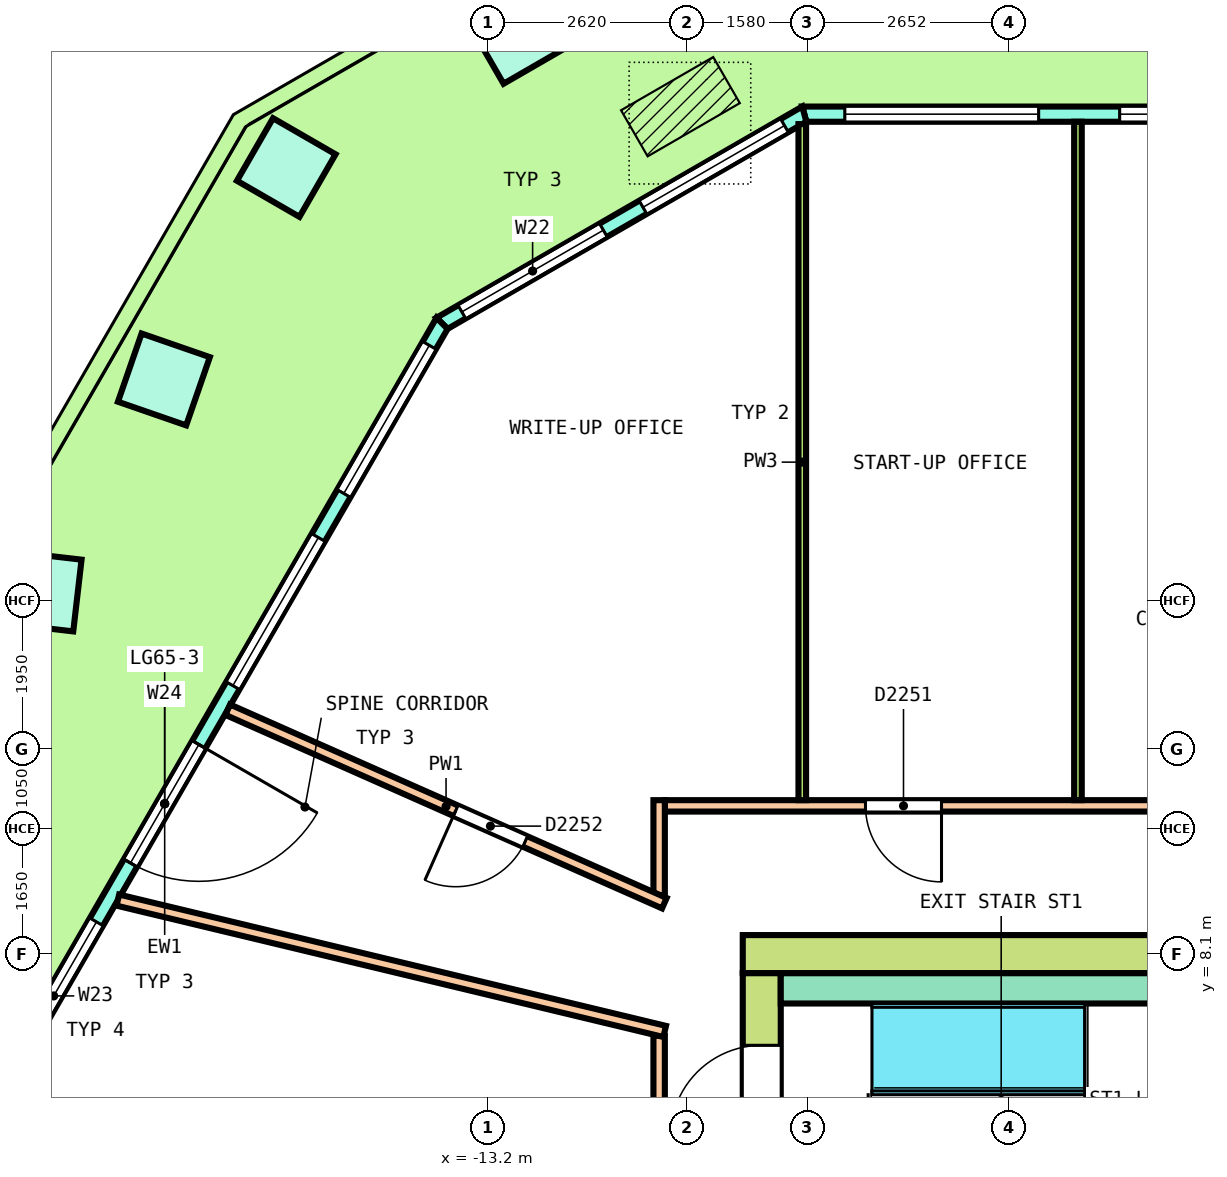
"""IFC4 building model, lengths in metres.
Left out: names, types, materials, properties, quantities, classifications, styles, units other than length and angle.
Written with IfcOpenShell. Run it as: python <this file> out.ifc"""

import sys

from ifc_helpers import new_model, si_unit, direction, frame, frame_2d, origin, origin_2d, place, context, subcontext, project, spatial, polyline, rectangle, outline, extrude, element, fill, save


model = new_model("IFC4")
c1 = context("Model", 3, precision=1e-05, world=origin(), true_north=direction((0.0, 1.0)))
c2 = subcontext(c1, "Body", "Model", "MODEL_VIEW")
j1 = project(units=[si_unit("LENGTHUNIT", "METRE"), si_unit("PLANEANGLEUNIT", "RADIAN")], contexts=[c1])
p1 = place(None, origin())
s1 = spatial("IfcSite", under=j1, at=p1, CompositionType="ELEMENT")
p2 = place(p1, origin())
s2 = spatial("IfcBuilding", under=s1, at=p2, CompositionType="ELEMENT")
p3 = place(p2, frame((0.0, 0.0, 295.0)))
s3 = spatial("IfcBuildingStorey", under=s2, at=p3, CompositionType="ELEMENT", Elevation=295.0)
for number, where, z_axis, x_axis in (
    (1, (-12.823, 20.199, 0.0), (-0.036, 0.0, 0.999), (-0.865, -0.5, -0.031)),
    (2, (-15.856, 18.448, 0.0), (-0.036, 0.0, 0.999), (-0.499, -0.866, -0.018)),
):
    element("IfcColumn", number, at=place(p3, frame(where, z_axis=z_axis, x_axis=x_axis)), inside=s3, PredefinedType="COLUMN", context=c2, shape_type="SweptSolid", body=[
        extrude(rectangle(XDim=0.95, YDim=0.95, at=origin_2d()), origin(), (0.0, 0.0, 1.0), 3.642),
    ])
p4 = place(p3, frame((-17.466, 15.66, 0.0), z_axis=(-0.032646772519, 0.006301430425, 0.999447087253), x_axis=(-0.500366215775, -0.865745428355, -0.010885926408)))
e3 = element("IfcColumn", 3, at=p4, inside=s3, PredefinedType="COLUMN", context=c2, shape_type="SweptSolid", body=[
    extrude(rectangle(XDim=0.95, YDim=0.95, at=origin_2d()), origin(), (0.0, 0.0, 1.0), 3.642),
])
p5 = place(p3, frame((-19.075, 12.872, 0.0), z_axis=(-0.029028337746, 0.012536487664, 0.999499971028), x_axis=(-0.499520818378, -0.866294227933, -0.003641793127)))
e4 = element("IfcColumn", 4, at=p5, inside=s3, PredefinedType="COLUMN", context=c2, shape_type="SweptSolid", body=[
    extrude(rectangle(XDim=0.95, YDim=0.95, at=origin_2d()), origin(), (0.0, 0.0, 1.0), 3.642),
])
p6 = place(p3, frame((9.04, 19.15, 0.0), z_axis=(0.0, 0.0, 1.0), x_axis=(-1.0, 0.0, 0.0)))
e5 = element("IfcWall", 5, at=p6, inside=s3, PredefinedType="SOLIDWALL", context=c2, shape_type="SweptSolid", body=[
    extrude(outline(polyline([(-0.027, -0.1), (0.98, -0.1), (1.988, -0.1), (2.995, -0.1), (4.003, -0.1), (5.01, -0.1), (6.018, -0.1), (7.025, -0.1), (8.033, -0.1), (9.04, -0.1), (10.047, -0.1), (11.055, -0.1), (12.062, -0.1), (13.07, -0.1), (14.077, -0.1), (15.085, -0.1), (16.092, -0.1), (17.1, -0.1), (18.107, -0.1), (18.053, 0.1), (17.052, 0.1), (16.05, 0.1), (15.049, 0.1), (14.047, 0.1), (13.046, 0.1), (12.044, 0.1), (11.043, 0.1), (10.042, 0.1), (9.04, 0.1), (8.039, 0.1), (7.037, 0.1), (6.036, 0.1), (5.034, 0.1), (4.033, 0.1), (3.031, 0.1), (2.03, 0.1), (1.028, 0.1), (0.027, 0.1), (-0.027, -0.1)])), origin(), (0.0, 0.0, 1.0), 3.7),
])
p7 = place(p6, frame((0.533, 0.0, 0.1)))
e6 = element("IfcOpeningElement", 6, at=p7, cuts=e5, PredefinedType="OPENING", context=c2, shape_type="SweptSolid", body=[
    extrude(rectangle(XDim=2.55, YDim=2.75, at=frame_2d((1.275, 1.375))), frame((0.0, 0.11, 0.0), z_axis=(0.0, -1.0, 0.0), x_axis=(1.0, 0.0, 0.0)), (0.0, 0.0, 1.0), 0.22),
])
p8 = place(p6, frame((4.149, 0.0, 0.1)))
e7 = element("IfcOpeningElement", 7, at=p8, cuts=e5, PredefinedType="OPENING", context=c2, shape_type="SweptSolid", body=[
    extrude(rectangle(XDim=2.55, YDim=2.75, at=frame_2d((1.275, 1.375))), frame((0.0, 0.11, 0.0), z_axis=(0.0, -1.0, 0.0), x_axis=(1.0, 0.0, 0.0)), (0.0, 0.0, 1.0), 0.22),
])
p9 = place(p6, frame((8.14, 0.0, 0.0)))
e8 = element("IfcOpeningElement", 8, at=p9, cuts=e5, PredefinedType="OPENING", context=c2, shape_type="SweptSolid", body=[
    extrude(rectangle(XDim=1.8, YDim=2.4, at=frame_2d((0.9, 1.2))), frame((0.0, 0.11, 0.0), z_axis=(0.0, -1.0, 0.0), x_axis=(1.0, 0.0, 0.0)), (0.0, 0.0, 1.0), 0.22),
])
p10 = place(p6, frame((8.14, 0.0, 2.55)))
e9 = element("IfcOpeningElement", 9, at=p10, cuts=e5, PredefinedType="OPENING", context=c2, shape_type="SweptSolid", body=[
    extrude(rectangle(XDim=1.8, YDim=0.3, at=frame_2d((0.9, 0.15))), frame((0.0, 0.11, 0.0), z_axis=(0.0, -1.0, 0.0), x_axis=(1.0, 0.0, 0.0)), (0.0, 0.0, 1.0), 0.22),
])
p11 = place(p6, frame((11.381, 0.0, 0.1)))
e10 = element("IfcOpeningElement", 10, at=p11, cuts=e5, PredefinedType="OPENING", context=c2, shape_type="SweptSolid", body=[
    extrude(rectangle(XDim=2.55, YDim=2.75, at=frame_2d((1.275, 1.375))), frame((0.0, 0.11, 0.0), z_axis=(0.0, -1.0, 0.0), x_axis=(1.0, 0.0, 0.0)), (0.0, 0.0, 1.0), 0.22),
])
p12 = place(p6, frame((14.997, 0.0, 0.1)))
e11 = element("IfcOpeningElement", 11, at=p12, cuts=e5, PredefinedType="OPENING", context=c2, shape_type="SweptSolid", body=[
    extrude(rectangle(XDim=2.55, YDim=2.75, at=frame_2d((1.275, 1.375))), frame((0.0, 0.11, 0.0), z_axis=(0.0, -1.0, 0.0), x_axis=(1.0, 0.0, 0.0)), (0.0, 0.0, 1.0), 0.22),
])
p13 = place(p3, frame((-9.04, 19.15, 0.0), z_axis=(0.0, 0.0, 1.0), x_axis=(-0.866026017613, -0.499998936816, 0.0)))
e12 = element("IfcWall", 12, at=p13, inside=s3, PredefinedType="SOLIDWALL", context=c2, shape_type="SweptSolid", body=[
    extrude(outline(polyline([(-0.027, -0.1), (1.084, -0.1), (2.196, -0.1), (3.307, -0.1), (4.419, -0.1), (5.53, -0.1), (5.477, 0.1), (4.387, 0.1), (3.297, 0.1), (2.207, 0.1), (1.117, 0.1), (0.027, 0.1), (-0.027, -0.1)])), origin(), (0.0, 0.0, 1.0), 3.7),
])
p14 = place(p13, frame((0.301, 0.0, 0.1)))
e13 = element("IfcOpeningElement", 13, at=p14, cuts=e12, PredefinedType="OPENING", context=c2, shape_type="SweptSolid", body=[
    extrude(rectangle(XDim=2.15, YDim=2.75, at=frame_2d((1.075, 1.375))), frame((0.0, 0.11, 0.0), z_axis=(0.0, -1.0, 0.0), x_axis=(1.0, 0.0, 0.0)), (0.0, 0.0, 1.0), 0.22),
])
p15 = place(p13, frame((3.052, 0.0, 0.1)))
e14 = element("IfcOpeningElement", 14, at=p15, cuts=e12, PredefinedType="OPENING", context=c2, shape_type="SweptSolid", body=[
    extrude(rectangle(XDim=2.15, YDim=2.75, at=frame_2d((1.075, 1.375))), frame((0.0, 0.11, 0.0), z_axis=(0.0, -1.0, 0.0), x_axis=(1.0, 0.0, 0.0)), (0.0, 0.0, 1.0), 0.22),
])
p16 = place(p3, frame((-13.806, 16.398, 0.0), z_axis=(0.0, 0.0, 1.0), x_axis=(-0.500006712695, -0.866021528173, 0.0)))
e15 = element("IfcWall", 15, at=p16, inside=s3, PredefinedType="SOLIDWALL", context=c2, shape_type="SweptSolid", body=[
    extrude(outline(polyline([(-0.027, -0.1), (1.02, -0.1), (2.066, -0.1), (3.113, -0.1), (4.159, -0.1), (5.205, -0.1), (6.252, -0.1), (7.298, -0.1), (8.345, -0.1), (9.391, -0.1), (10.438, -0.1), (11.484, -0.1), (12.531, -0.1), (13.577, -0.1), (14.623, -0.1), (14.57, 0.1), (13.531, 0.1), (12.492, 0.1), (11.453, 0.1), (10.415, 0.1), (9.376, 0.1), (8.337, 0.1), (7.298, 0.1), (6.26, 0.1), (5.221, 0.1), (4.182, 0.1), (3.143, 0.1), (2.104, 0.1), (1.066, 0.1), (0.027, 0.1), (-0.027, -0.1)])), origin(), (0.0, 0.0, 1.0), 3.7),
])
p17 = place(p16, frame((0.335, 0.0, 0.1)))
e16 = element("IfcOpeningElement", 16, at=p17, cuts=e15, PredefinedType="OPENING", context=c2, shape_type="SweptSolid", body=[
    extrude(rectangle(XDim=2.25, YDim=2.75, at=frame_2d((1.125, 1.375))), frame((0.0, 0.11, 0.0), z_axis=(0.0, -1.0, 0.0), x_axis=(1.0, 0.0, 0.0)), (0.0, 0.0, 1.0), 0.22),
])
p18 = place(p16, frame((3.254, 0.0, 0.1)))
e17 = element("IfcOpeningElement", 17, at=p18, cuts=e15, PredefinedType="OPENING", context=c2, shape_type="SweptSolid", body=[
    extrude(rectangle(XDim=2.25, YDim=2.75, at=frame_2d((1.125, 1.375))), frame((0.0, 0.11, 0.0), z_axis=(0.0, -1.0, 0.0), x_axis=(1.0, 0.0, 0.0)), (0.0, 0.0, 1.0), 0.22),
])
p19 = place(p16, frame((6.398, 0.0, 0.0)))
e18 = element("IfcOpeningElement", 18, at=p19, cuts=e15, PredefinedType="OPENING", context=c2, shape_type="SweptSolid", body=[
    extrude(rectangle(XDim=1.8, YDim=2.4, at=frame_2d((0.9, 1.2))), frame((0.0, 0.11, 0.0), z_axis=(0.0, -1.0, 0.0), x_axis=(1.0, 0.0, 0.0)), (0.0, 0.0, 1.0), 0.22),
])
p20 = place(p16, frame((6.398, 0.0, 2.55)))
e19 = element("IfcOpeningElement", 19, at=p20, cuts=e15, PredefinedType="OPENING", context=c2, shape_type="SweptSolid", body=[
    extrude(rectangle(XDim=1.8, YDim=0.3, at=frame_2d((0.9, 0.15))), frame((0.0, 0.11, 0.0), z_axis=(0.0, -1.0, 0.0), x_axis=(1.0, 0.0, 0.0)), (0.0, 0.0, 1.0), 0.22),
])
p21 = place(p16, frame((9.093, 0.0, 0.1)))
e20 = element("IfcOpeningElement", 20, at=p21, cuts=e15, PredefinedType="OPENING", context=c2, shape_type="SweptSolid", body=[
    extrude(rectangle(XDim=2.25, YDim=2.75, at=frame_2d((1.125, 1.375))), frame((0.0, 0.11, 0.0), z_axis=(0.0, -1.0, 0.0), x_axis=(1.0, 0.0, 0.0)), (0.0, 0.0, 1.0), 0.22),
])
p22 = place(p16, frame((12.012, 0.0, 0.1)))
e21 = element("IfcOpeningElement", 21, at=p22, cuts=e15, PredefinedType="OPENING", context=c2, shape_type="SweptSolid", body=[
    extrude(rectangle(XDim=2.25, YDim=2.75, at=frame_2d((1.125, 1.375))), frame((0.0, 0.11, 0.0), z_axis=(0.0, -1.0, 0.0), x_axis=(1.0, 0.0, 0.0)), (0.0, 0.0, 1.0), 0.22),
])
p23 = place(p3, frame((-9.85, 8.1, 0.0), z_axis=(0.0, 0.0, 1.0), x_axis=(1.0, 0.0, 0.0)))
e22 = element("IfcWall", 22, at=p23, inside=s3, PredefinedType="SHEAR", context=c2, shape_type="SweptSolid", body=[
    extrude(rectangle(XDim=19.7, YDim=0.5, at=frame_2d((9.85, 0.0))), origin(), (0.0, 0.0, 1.0), 3.7),
])
p24 = place(p23, frame((10.775, 0.0, 0.0)))
e23 = element("IfcOpeningElement", 23, at=p24, cuts=e22, PredefinedType="OPENING", context=c2, shape_type="SweptSolid", body=[
    extrude(rectangle(XDim=1.4, YDim=2.1, at=frame_2d((0.7, 1.05))), frame((0.0, 0.26, 0.0), z_axis=(0.0, -1.0, 0.0), x_axis=(1.0, 0.0, 0.0)), (0.0, 0.0, 1.0), 0.52),
])
p25 = place(p3, frame((-9.6, -7.85, 0.0), z_axis=(0.0, 0.0, 1.0), x_axis=(0.0, 1.0, 0.0)))
e24 = element("IfcWall", 24, at=p25, inside=s3, PredefinedType="SHEAR", context=c2, shape_type="SweptSolid", body=[
    extrude(rectangle(XDim=15.7, YDim=0.5, at=frame_2d((7.85, 0.0))), origin(), (0.0, 0.0, 1.0), 3.7),
])
p26 = place(p25, frame((6.65, 0.0, 0.0)))
e25 = element("IfcOpeningElement", 25, at=p26, cuts=e24, PredefinedType="OPENING", context=c2, shape_type="SweptSolid", body=[
    extrude(rectangle(XDim=2.4, YDim=2.1, at=frame_2d((1.2, 1.05))), frame((0.0, 0.26, 0.0), z_axis=(0.0, -1.0, 0.0), x_axis=(1.0, 0.0, 0.0)), (0.0, 0.0, 1.0), 0.52),
])
p27 = place(p25, frame((13.55, 0.0, 0.0)))
e26 = element("IfcOpeningElement", 26, at=p27, cuts=e24, PredefinedType="OPENING", context=c2, shape_type="SweptSolid", body=[
    extrude(rectangle(XDim=1.2, YDim=2.1, at=frame_2d((0.6, 1.05))), frame((0.0, 0.26, 0.0), z_axis=(0.0, -1.0, 0.0), x_axis=(1.0, 0.0, 0.0)), (0.0, 0.0, 1.0), 0.52),
])
p28 = place(p25, frame((0.95, 0.0, 0.0)))
e27 = element("IfcOpeningElement", 27, at=p28, cuts=e24, PredefinedType="OPENING", context=c2, shape_type="SweptSolid", body=[
    extrude(rectangle(XDim=1.2, YDim=2.1, at=frame_2d((0.6, 1.05))), frame((0.0, 0.26, 0.0), z_axis=(0.0, -1.0, 0.0), x_axis=(1.0, 0.0, 0.0)), (0.0, 0.0, 1.0), 0.52),
])
p29 = place(p3, frame((-9.35, 7.65, 0.0), z_axis=(0.0, 0.0, 1.0), x_axis=(1.0, 0.0, 0.0)))
e28 = element("IfcWall", 28, at=p29, inside=s3, PredefinedType="SOLIDWALL", context=c2, shape_type="SweptSolid", body=[
    extrude(rectangle(XDim=5.8, YDim=0.4, at=frame_2d((2.9, 0.0))), origin(), (0.0, 0.0, 1.0), 3.7),
])
p30 = place(p3, frame((-10.875, 10.05, 0.0), z_axis=(0.0, 0.0, 1.0), x_axis=(1.0, 0.0, 0.0)))
e29 = element("IfcWall", 29, at=p30, inside=s3, PredefinedType="PARTITIONING", context=c2, shape_type="SweptSolid", body=[
    extrude(rectangle(XDim=21.775, YDim=0.15, at=frame_2d((10.887, 0.0))), origin(), (0.0, 0.0, 1.0), 2.9),
])
p31 = place(p30, frame((20.411, 0.0, 0.0)))
e30 = element("IfcOpeningElement", 30, at=p31, cuts=e29, PredefinedType="OPENING", context=c2, shape_type="SweptSolid", body=[
    extrude(rectangle(XDim=1.0, YDim=2.1, at=frame_2d((0.5, 1.05))), frame((0.0, 0.085, 0.0), z_axis=(0.0, -1.0, 0.0), x_axis=(1.0, 0.0, 0.0)), (0.0, 0.0, 1.0), 0.17),
])
p32 = place(p30, frame((16.518, 0.0, 0.0)))
e31 = element("IfcOpeningElement", 31, at=p32, cuts=e29, PredefinedType="OPENING", context=c2, shape_type="SweptSolid", body=[
    extrude(rectangle(XDim=1.2, YDim=2.1, at=frame_2d((0.6, 1.05))), frame((0.0, 0.085, 0.0), z_axis=(0.0, -1.0, 0.0), x_axis=(1.0, 0.0, 0.0)), (0.0, 0.0, 1.0), 0.17),
])
p33 = place(p30, frame((7.659, 0.0, 0.0)))
e32 = element("IfcOpeningElement", 32, at=p33, cuts=e29, PredefinedType="OPENING", context=c2, shape_type="SweptSolid", body=[
    extrude(rectangle(XDim=1.2, YDim=2.1, at=frame_2d((0.6, 1.05))), frame((0.0, 0.085, 0.0), z_axis=(0.0, -1.0, 0.0), x_axis=(1.0, 0.0, 0.0)), (0.0, 0.0, 1.0), 0.17),
])
p34 = place(p30, frame((2.64, 0.0, 0.0)))
e33 = element("IfcOpeningElement", 33, at=p34, cuts=e29, PredefinedType="OPENING", context=c2, shape_type="SweptSolid", body=[
    extrude(rectangle(XDim=1.0, YDim=2.1, at=frame_2d((0.5, 1.05))), frame((0.0, 0.085, 0.0), z_axis=(0.0, -1.0, 0.0), x_axis=(1.0, 0.0, 0.0)), (0.0, 0.0, 1.0), 0.17),
])
p35 = place(p3, frame((-10.95, -9.975, 0.0), z_axis=(0.0, 0.0, 1.0), x_axis=(0.0, 1.0, 0.0)))
e34 = element("IfcWall", 34, at=p35, inside=s3, PredefinedType="PARTITIONING", context=c2, shape_type="SweptSolid", body=[
    extrude(rectangle(XDim=17.0, YDim=0.15, at=frame_2d((8.5, 0.0))), origin(), (0.0, 0.0, 1.0), 2.9),
])
p36 = place(p35, frame((10.72, 0.0, 0.0)))
e35 = element("IfcOpeningElement", 35, at=p36, cuts=e34, PredefinedType="OPENING", context=c2, shape_type="SweptSolid", body=[
    extrude(rectangle(XDim=1.2, YDim=2.1, at=frame_2d((0.6, 1.05))), frame((0.0, 0.085, 0.0), z_axis=(0.0, -1.0, 0.0), x_axis=(1.0, 0.0, 0.0)), (0.0, 0.0, 1.0), 0.17),
])
p37 = place(p35, frame((5.916, 0.0, 0.0)))
e36 = element("IfcOpeningElement", 36, at=p37, cuts=e34, PredefinedType="OPENING", context=c2, shape_type="SweptSolid", body=[
    extrude(rectangle(XDim=1.0, YDim=2.1, at=frame_2d((0.5, 1.05))), frame((0.0, 0.085, 0.0), z_axis=(0.0, -1.0, 0.0), x_axis=(1.0, 0.0, 0.0)), (0.0, 0.0, 1.0), 0.17),
])
p38 = place(p35, frame((2.379, 0.0, 0.0)))
e37 = element("IfcOpeningElement", 37, at=p38, cuts=e34, PredefinedType="OPENING", context=c2, shape_type="SweptSolid", body=[
    extrude(rectangle(XDim=1.2, YDim=2.1, at=frame_2d((0.6, 1.05))), frame((0.0, 0.085, 0.0), z_axis=(0.0, -1.0, 0.0), x_axis=(1.0, 0.0, 0.0)), (0.0, 0.0, 1.0), 0.17),
])
p39 = place(p3, frame((-10.95, 8.875, 0.0), z_axis=(0.0, 0.0, 1.0), x_axis=(0.0, 1.0, 0.0)))
e38 = element("IfcWall", 38, at=p39, inside=s3, PredefinedType="PARTITIONING", context=c2, shape_type="SweptSolid", body=[
    extrude(rectangle(XDim=1.25, YDim=0.15, at=frame_2d((0.625, 0.0))), origin(), (0.0, 0.0, 1.0), 2.9),
])
p40 = place(p3, frame((-16.625, 11.315, 0.0), z_axis=(0.0, 0.0, 1.0), x_axis=(0.914242073132, -0.405168399207, 0.0)))
e39 = element("IfcWall", 39, at=p40, inside=s3, PredefinedType="PARTITIONING", context=c2, shape_type="SweptSolid", body=[
    extrude(rectangle(XDim=6.283, YDim=0.15, at=frame_2d((3.142, 0.0))), origin(), (0.0, 0.0, 1.0), 2.9),
])
p41 = place(p40, frame((3.28, 0.0, 0.0)))
e40 = element("IfcOpeningElement", 40, at=p41, cuts=e39, PredefinedType="OPENING", context=c2, shape_type="SweptSolid", body=[
    extrude(rectangle(XDim=1.0, YDim=2.1, at=frame_2d((0.5, 1.05))), frame((0.0, 0.085, 0.0), z_axis=(0.0, -1.0, 0.0), x_axis=(1.0, 0.0, 0.0)), (0.0, 0.0, 1.0), 0.17),
])
p42 = place(p3, frame((-18.072, 8.81, 0.0), z_axis=(0.0, 0.0, 1.0), x_axis=(0.972352247426, -0.23351896481, 0.0)))
e41 = element("IfcWall", 41, at=p42, inside=s3, PredefinedType="PARTITIONING", context=c2, shape_type="SweptSolid", body=[
    extrude(rectangle(XDim=7.399, YDim=0.15, at=frame_2d((3.699, 0.0))), origin(), (0.0, 0.0, 1.0), 2.9),
])
p43 = place(p3, frame((-5.44, 10.125, 0.0), z_axis=(0.0, 0.0, 1.0), x_axis=(0.0, 1.0, 0.0)))
e42 = element("IfcWall", 42, at=p43, inside=s3, PredefinedType="PARTITIONING", context=c2, shape_type="SweptSolid", body=[
    extrude(rectangle(XDim=8.925, YDim=0.1, at=frame_2d((4.462, 0.0))), origin(), (0.0, 0.0, 1.0), 2.9),
])
p44 = place(p3, frame((-9.067, 10.125, 0.0), z_axis=(0.0, 0.0, 1.0), x_axis=(0.0, 1.0, 0.0)))
e43 = element("IfcWall", 43, at=p44, inside=s3, PredefinedType="PARTITIONING", context=c2, shape_type="SweptSolid", body=[
    extrude(rectangle(XDim=8.894, YDim=0.1, at=frame_2d((4.447, 0.0))), origin(), (0.0, 0.0, 1.0), 2.9),
])
p45 = place(p11, origin())
e44 = element("IfcWindow", 44, at=p45, inside=s3, PartitioningType="SINGLE_PANEL", PredefinedType="WINDOW", context=c2, shape_type="SweptSolid", body=[
    extrude(rectangle(XDim=2.55, YDim=2.75, at=frame_2d((1.275, 1.375))), frame((0.0, 0.03, 0.0), z_axis=(0.0, -1.0, 0.0), x_axis=(1.0, 0.0, 0.0)), (0.0, 0.0, 1.0), 0.06),
])
fill(e10, e44)
p46 = place(p12, origin())
e45 = element("IfcWindow", 45, at=p46, inside=s3, PartitioningType="SINGLE_PANEL", PredefinedType="WINDOW", context=c2, shape_type="SweptSolid", body=[
    extrude(rectangle(XDim=2.55, YDim=2.75, at=frame_2d((1.275, 1.375))), frame((0.0, 0.03, 0.0), z_axis=(0.0, -1.0, 0.0), x_axis=(1.0, 0.0, 0.0)), (0.0, 0.0, 1.0), 0.06),
])
fill(e11, e45)
p47 = place(p14, origin())
e46 = element("IfcWindow", 46, at=p47, inside=s3, PartitioningType="SINGLE_PANEL", PredefinedType="WINDOW", context=c2, shape_type="SweptSolid", body=[
    extrude(rectangle(XDim=2.15, YDim=2.75, at=frame_2d((1.075, 1.375))), frame((0.0, 0.03, 0.0), z_axis=(0.0, -1.0, 0.0), x_axis=(1.0, 0.0, 0.0)), (0.0, 0.0, 1.0), 0.06),
])
fill(e13, e46)
p48 = place(p15, origin())
e47 = element("IfcWindow", 47, at=p48, inside=s3, PartitioningType="SINGLE_PANEL", PredefinedType="WINDOW", context=c2, shape_type="SweptSolid", body=[
    extrude(rectangle(XDim=2.15, YDim=2.75, at=frame_2d((1.075, 1.375))), frame((0.0, 0.03, 0.0), z_axis=(0.0, -1.0, 0.0), x_axis=(1.0, 0.0, 0.0)), (0.0, 0.0, 1.0), 0.06),
])
fill(e14, e47)
p49 = place(p17, origin())
e48 = element("IfcWindow", 48, at=p49, inside=s3, PartitioningType="SINGLE_PANEL", PredefinedType="WINDOW", context=c2, shape_type="SweptSolid", body=[
    extrude(rectangle(XDim=2.25, YDim=2.75, at=frame_2d((1.125, 1.375))), frame((0.0, 0.03, 0.0), z_axis=(0.0, -1.0, 0.0), x_axis=(1.0, 0.0, 0.0)), (0.0, 0.0, 1.0), 0.06),
])
fill(e16, e48)
p50 = place(p18, origin())
e49 = element("IfcWindow", 49, at=p50, inside=s3, PartitioningType="SINGLE_PANEL", PredefinedType="WINDOW", context=c2, shape_type="SweptSolid", body=[
    extrude(rectangle(XDim=2.25, YDim=2.75, at=frame_2d((1.125, 1.375))), frame((0.0, 0.03, 0.0), z_axis=(0.0, -1.0, 0.0), x_axis=(1.0, 0.0, 0.0)), (0.0, 0.0, 1.0), 0.06),
])
fill(e17, e49)
p51 = place(p19, origin())
e50 = element("IfcDoor", 50, at=p51, inside=s3, OperationType="DOUBLE_DOOR_SINGLE_SWING", PredefinedType="DOOR", context=c2, shape_type="SweptSolid", body=[
    extrude(rectangle(XDim=1.8, YDim=2.4, at=frame_2d((0.9, 1.2))), frame((0.0, 0.025, 0.0), z_axis=(0.0, -1.0, 0.0), x_axis=(1.0, 0.0, 0.0)), (0.0, 0.0, 1.0), 0.05),
])
fill(e18, e50)
p52 = place(p20, origin())
e51 = element("IfcWindow", 51, at=p52, inside=s3, PartitioningType="SINGLE_PANEL", PredefinedType="WINDOW", context=c2, shape_type="SweptSolid", body=[
    extrude(rectangle(XDim=1.8, YDim=0.3, at=frame_2d((0.9, 0.15))), frame((0.0, 0.03, 0.0), z_axis=(0.0, -1.0, 0.0), x_axis=(1.0, 0.0, 0.0)), (0.0, 0.0, 1.0), 0.06),
])
fill(e19, e51)
p53 = place(p21, origin())
e52 = element("IfcWindow", 52, at=p53, inside=s3, PartitioningType="SINGLE_PANEL", PredefinedType="WINDOW", context=c2, shape_type="SweptSolid", body=[
    extrude(rectangle(XDim=2.25, YDim=2.75, at=frame_2d((1.125, 1.375))), frame((0.0, 0.03, 0.0), z_axis=(0.0, -1.0, 0.0), x_axis=(1.0, 0.0, 0.0)), (0.0, 0.0, 1.0), 0.06),
])
fill(e20, e52)
p54 = place(p27, origin())
e53 = element("IfcDoor", 53, at=p54, inside=s3, OperationType="SINGLE_SWING_RIGHT", PredefinedType="DOOR", context=c2, shape_type="SweptSolid", body=[
    extrude(rectangle(XDim=1.2, YDim=2.1, at=frame_2d((0.6, 1.05))), frame((0.0, 0.2, 0.0), z_axis=(0.0, -1.0, 0.0), x_axis=(1.0, 0.0, 0.0)), (0.0, 0.0, 1.0), 0.4),
])
fill(e26, e53)
p55 = place(p34, origin())
e54 = element("IfcDoor", 54, at=p55, inside=s3, OperationType="SINGLE_SWING_RIGHT", PredefinedType="DOOR", context=c2, shape_type="SweptSolid", body=[
    extrude(rectangle(XDim=1.0, YDim=2.1, at=frame_2d((0.5, 1.05))), frame((0.0, 0.025, 0.0), z_axis=(0.0, -1.0, 0.0), x_axis=(1.0, 0.0, 0.0)), (0.0, 0.0, 1.0), 0.05),
])
fill(e33, e54)
p56 = place(p41, origin())
e55 = element("IfcDoor", 55, at=p56, inside=s3, OperationType="SINGLE_SWING_LEFT", PredefinedType="DOOR", context=c2, shape_type="SweptSolid", body=[
    extrude(rectangle(XDim=1.0, YDim=2.1, at=frame_2d((0.5, 1.05))), frame((0.0, 0.025, 0.0), z_axis=(0.0, -1.0, 0.0), x_axis=(1.0, 0.0, 0.0)), (0.0, 0.0, 1.0), 0.05),
])
fill(e40, e55)
save(model, sys.argv[1])
